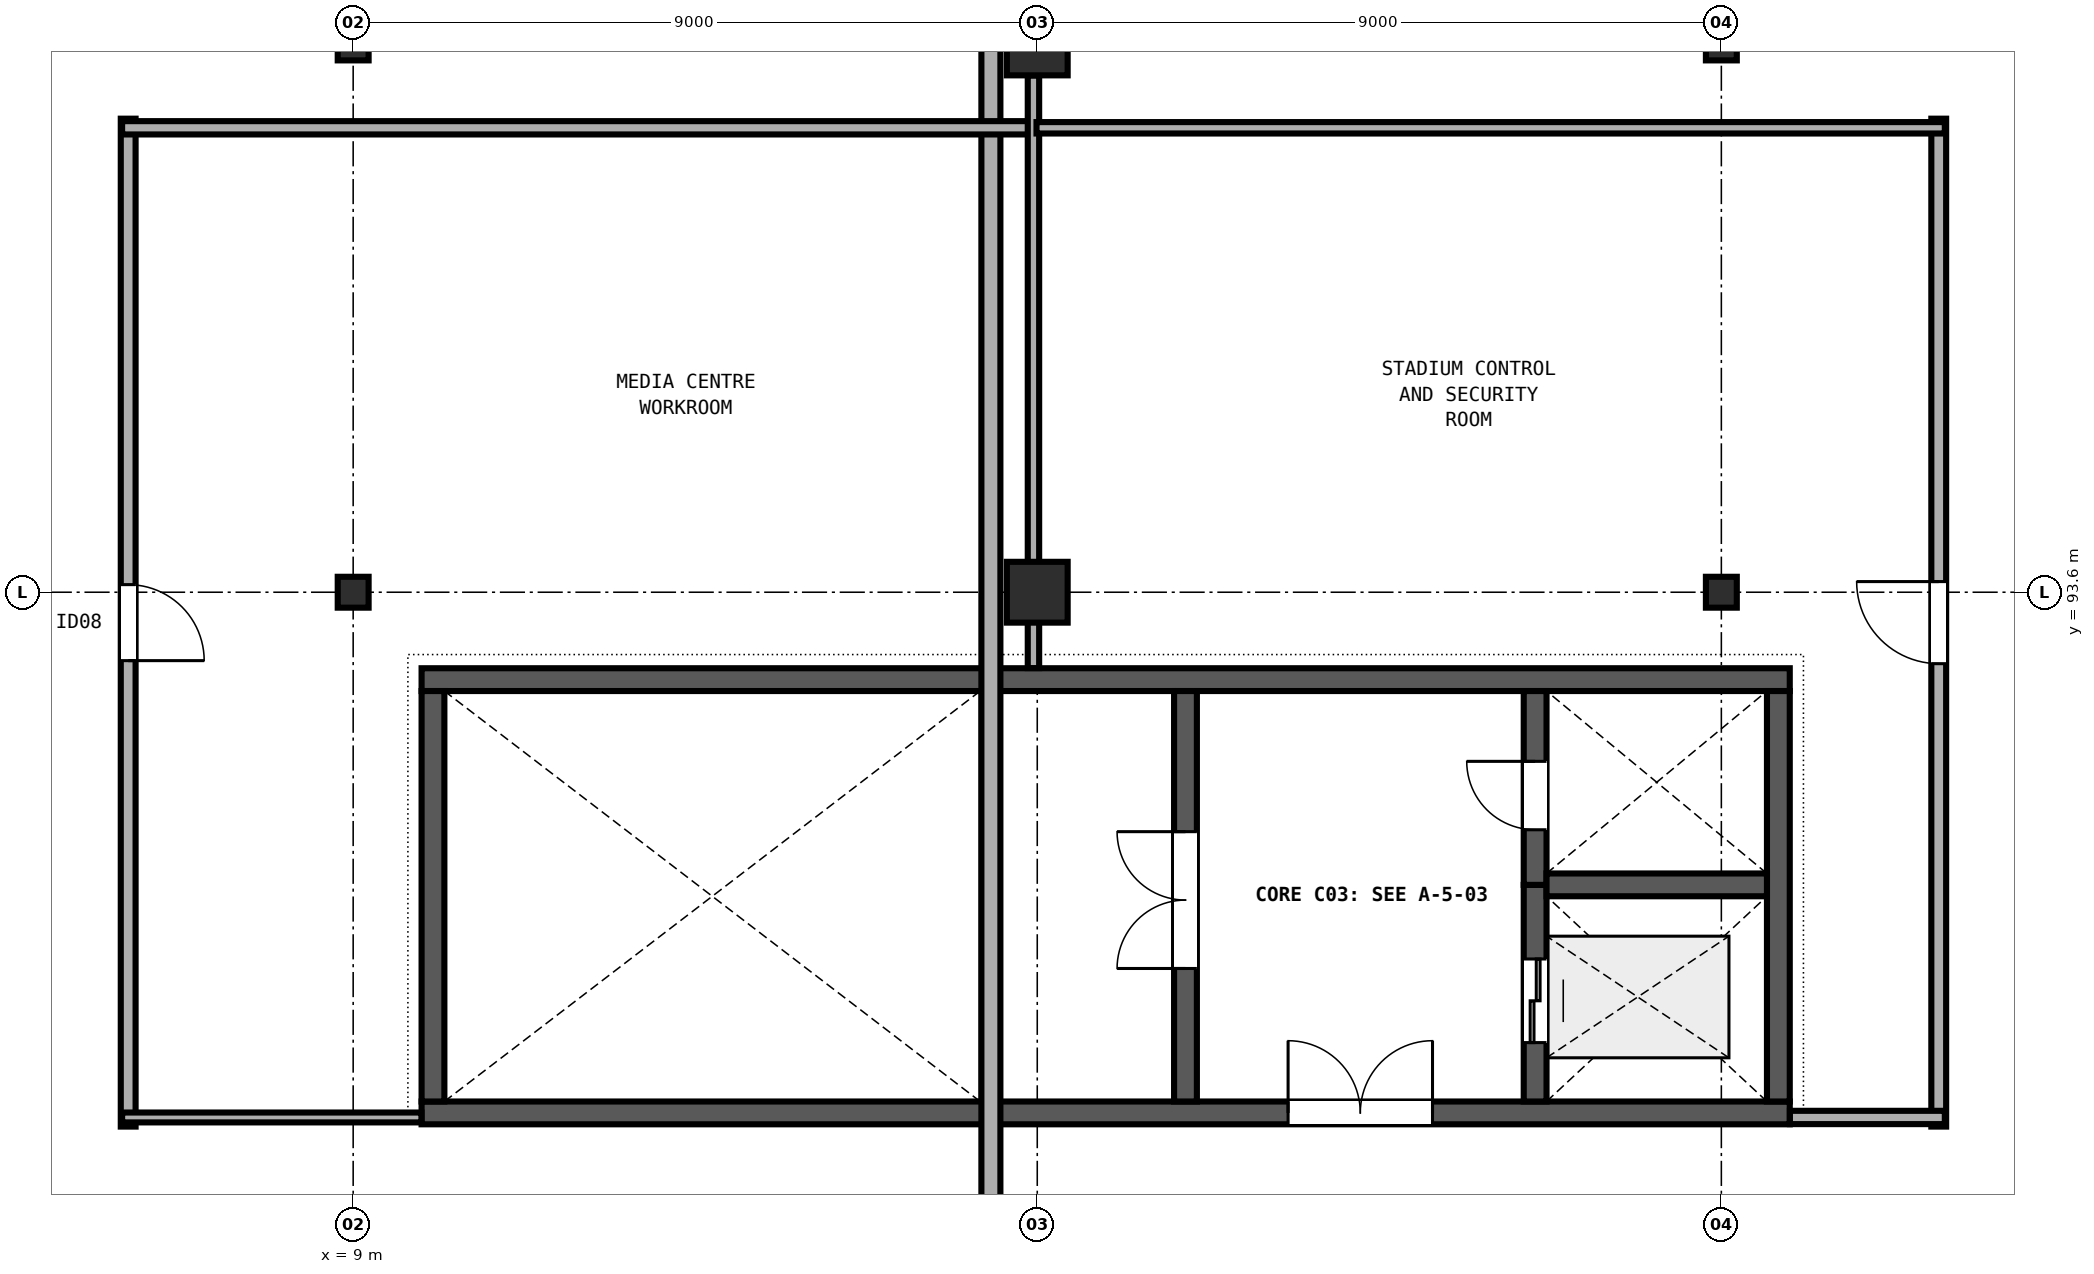
"""IFC4 building model, lengths in metres.
Left out: names, types, materials, properties, quantities, classifications, styles, units other than length and angle.
Written with IfcOpenShell. Run it as: python <this file> out.ifc"""

import sys

from ifc_helpers import new_model, si_unit, direction, frame, frame_2d, origin, origin_2d, place, context, subcontext, project, spatial, rectangle, hollow_circle, extrude, element, fill, save


model = new_model("IFC4")
c1 = context("Model", 3, precision=1e-05, world=origin(), true_north=direction((0.0, 1.0)))
c2 = subcontext(c1, "Body", "Model", "MODEL_VIEW")
j1 = project(units=[si_unit("LENGTHUNIT", "METRE"), si_unit("PLANEANGLEUNIT", "RADIAN")], contexts=[c1])
p1 = place(None, origin())
s1 = spatial("IfcSite", under=j1, at=p1, CompositionType="ELEMENT")
p2 = place(p1, origin())
s2 = spatial("IfcBuilding", under=s1, at=p2, CompositionType="ELEMENT")
p3 = place(p2, frame((0.0, 0.0, 24.0)))
s3 = spatial("IfcBuildingStorey", under=s2, at=p3, CompositionType="ELEMENT", Elevation=24.0)
for number, where, z_axis, x_axis in (
    (1, (9.0, 93.6, 0.0), (0.0, 0.0, 1.0), (1.0, 0.0, 0.0)),
    (2, (9.0, 100.8, 0.0), (0.0, 0.0, 1.0), (1.0, 0.0, 0.0)),
):
    element("IfcColumn", number, at=place(p3, frame(where, z_axis=z_axis, x_axis=x_axis)), inside=s3, PredefinedType="COLUMN", context=c2, shape_type="SweptSolid", body=[
        extrude(hollow_circle(Radius=0.203, WallThickness=0.014, at=origin_2d()), origin(), (0.0, 0.0, 1.0), 4.8),
    ])
for number, where, z_axis, x_axis in (
    (3, (18.0, 93.6, 0.0), (0.0, 0.0, 1.0), (1.0, 0.0, 0.0)),
    (4, (18.0, 100.8, 0.0), (0.0, 0.0, 1.0), (1.0, 0.0, 0.0)),
):
    element("IfcColumn", number, at=place(p3, frame(where, z_axis=z_axis, x_axis=x_axis)), inside=s3, PredefinedType="COLUMN", context=c2, shape_type="SweptSolid", body=[
        extrude(rectangle(XDim=0.8, YDim=0.8, at=origin_2d()), origin(), (0.0, 0.0, 1.0), 4.8),
    ])
for number, where, z_axis, x_axis in (
    (5, (27.0, 93.6, 0.0), (0.0, 0.0, 1.0), (1.0, 0.0, 0.0)),
    (6, (27.0, 100.8, 0.0), (0.0, 0.0, 1.0), (1.0, 0.0, 0.0)),
):
    element("IfcColumn", number, at=place(p3, frame(where, z_axis=z_axis, x_axis=x_axis)), inside=s3, PredefinedType="COLUMN", context=c2, shape_type="SweptSolid", body=[
        extrude(hollow_circle(Radius=0.203, WallThickness=0.014, at=origin_2d()), origin(), (0.0, 0.0, 1.0), 4.8),
    ])
p4 = place(p3, frame((9.9, 86.75, 0.0), z_axis=(0.0, 0.0, 1.0), x_axis=(1.0, 0.0, 0.0)))
e7 = element("IfcWall", 7, at=p4, inside=s3, PredefinedType="SHEAR", context=c2, shape_type="SweptSolid", body=[
    extrude(rectangle(XDim=18.0, YDim=0.3, at=frame_2d((9.0, 0.0))), origin(), (0.0, 0.0, 1.0), 4.56),
])
p5 = place(p4, frame((11.4, 0.0, 0.0)))
e8 = element("IfcOpeningElement", 8, at=p5, cuts=e7, PredefinedType="OPENING", context=c2, shape_type="SweptSolid", body=[
    extrude(rectangle(XDim=1.9, YDim=2.25, at=frame_2d((0.95, 1.125))), frame((0.0, 0.16, 0.0), z_axis=(0.0, -1.0, 0.0), x_axis=(1.0, 0.0, 0.0)), (0.0, 0.0, 1.0), 0.32),
])
p6 = place(p3, frame((27.9, 92.45, 0.0), z_axis=(0.0, 0.0, 1.0), x_axis=(-1.0, 0.0, 0.0)))
e9 = element("IfcWall", 9, at=p6, inside=s3, PredefinedType="SHEAR", context=c2, shape_type="SweptSolid", body=[
    extrude(rectangle(XDim=18.0, YDim=0.3, at=frame_2d((9.0, 0.0))), origin(), (0.0, 0.0, 1.0), 4.56),
])
for number, where, z_axis, x_axis in (
    (10, (10.05, 92.3, 0.0), (0.0, 0.0, 1.0), (0.0, -1.0, 0.0)),
    (11, (27.75, 86.9, 0.0), (0.0, 0.0, 1.0), (0.0, 1.0, 0.0)),
):
    element("IfcWall", number, at=place(p3, frame(where, z_axis=z_axis, x_axis=x_axis)), inside=s3, PredefinedType="SHEAR", context=c2, shape_type="SweptSolid", body=[
        extrude(rectangle(XDim=5.4, YDim=0.3, at=frame_2d((2.7, 0.0))), origin(), (0.0, 0.0, 1.0), 4.56),
    ])
p7 = place(p3, frame((19.95, 86.9, 0.0), z_axis=(0.0, 0.0, 1.0), x_axis=(0.0, 1.0, 0.0)))
e12 = element("IfcWall", 12, at=p7, inside=s3, PredefinedType="SHEAR", context=c2, shape_type="SweptSolid", body=[
    extrude(rectangle(XDim=5.4, YDim=0.3, at=frame_2d((2.7, 0.0))), origin(), (0.0, 0.0, 1.0), 4.56),
])
p8 = place(p7, frame((1.75, 0.0, 0.0)))
e13 = element("IfcOpeningElement", 13, at=p8, cuts=e12, PredefinedType="OPENING", context=c2, shape_type="SweptSolid", body=[
    extrude(rectangle(XDim=1.8, YDim=2.25, at=frame_2d((0.9, 1.125))), frame((0.0, 0.16, 0.0), z_axis=(0.0, -1.0, 0.0), x_axis=(1.0, 0.0, 0.0)), (0.0, 0.0, 1.0), 0.32),
])
p9 = place(p3, frame((24.55, 86.9, 0.0), z_axis=(0.0, 0.0, 1.0), x_axis=(0.0, 1.0, 0.0)))
e14 = element("IfcWall", 14, at=p9, inside=s3, PredefinedType="SHEAR", context=c2, shape_type="SweptSolid", body=[
    extrude(rectangle(XDim=2.85, YDim=0.3, at=frame_2d((1.425, 0.0))), origin(), (0.0, 0.0, 1.0), 4.56),
])
p10 = place(p9, frame((0.775, 0.0, 0.0)))
e15 = element("IfcOpeningElement", 15, at=p10, cuts=e14, PredefinedType="OPENING", context=c2, shape_type="SweptSolid", body=[
    extrude(rectangle(XDim=1.1, YDim=2.1, at=frame_2d((0.55, 1.05))), frame((0.0, 0.16, 0.0), z_axis=(0.0, -1.0, 0.0), x_axis=(1.0, 0.0, 0.0)), (0.0, 0.0, 1.0), 0.32),
])
p11 = place(p3, frame((24.55, 89.75, 0.0), z_axis=(0.0, 0.0, 1.0), x_axis=(0.0, 1.0, 0.0)))
e16 = element("IfcWall", 16, at=p11, inside=s3, PredefinedType="SHEAR", context=c2, shape_type="SweptSolid", body=[
    extrude(rectangle(XDim=2.55, YDim=0.3, at=frame_2d((1.275, 0.0))), origin(), (0.0, 0.0, 1.0), 4.56),
])
p12 = place(p11, frame((0.725, 0.0, 0.0)))
e17 = element("IfcOpeningElement", 17, at=p12, cuts=e16, PredefinedType="OPENING", context=c2, shape_type="SweptSolid", body=[
    extrude(rectangle(XDim=0.9, YDim=2.1, at=frame_2d((0.45, 1.05))), frame((0.0, 0.16, 0.0), z_axis=(0.0, -1.0, 0.0), x_axis=(1.0, 0.0, 0.0)), (0.0, 0.0, 1.0), 0.32),
])
p13 = place(p3, frame((24.7, 89.75, 0.0), z_axis=(0.0, 0.0, 1.0), x_axis=(1.0, 0.0, 0.0)))
e18 = element("IfcWall", 18, at=p13, inside=s3, PredefinedType="SHEAR", context=c2, shape_type="SweptSolid", body=[
    extrude(rectangle(XDim=2.9, YDim=0.3, at=frame_2d((1.45, 0.0))), origin(), (0.0, 0.0, 1.0), 4.56),
])
p14 = place(p3, frame((17.39, 116.84, 4.8), z_axis=(0.0, 0.0, 1.0), x_axis=(0.0, -1.0, 0.0)))
e19 = element("IfcWall", 19, at=p14, inside=s3, PredefinedType="PARAPET", context=c2, shape_type="SweptSolid", body=[
    extrude(rectangle(XDim=71.68, YDim=0.25, at=frame_2d((35.84, 0.0))), origin(), (0.0, 0.0, 1.0), 0.65),
])
p15 = place(p3, frame((6.04, 99.83, 0.0), z_axis=(0.0, 0.0, 1.0), x_axis=(0.0, -1.0, 0.0)))
e20 = element("IfcWall", 20, at=p15, inside=s3, PredefinedType="PARTITIONING", context=c2, shape_type="SweptSolid", body=[
    extrude(rectangle(XDim=13.26, YDim=0.195, at=frame_2d((6.63, 0.0))), origin(), (0.0, 0.0, 1.0), 3.56),
])
p16 = place(p15, frame((6.13, 0.0, 0.0)))
e21 = element("IfcOpeningElement", 21, at=p16, cuts=e20, PredefinedType="OPENING", context=c2, shape_type="SweptSolid", body=[
    extrude(rectangle(XDim=1.0, YDim=2.1, at=frame_2d((0.5, 1.05))), frame((0.0, 0.107, 0.0), z_axis=(0.0, -1.0, 0.0), x_axis=(1.0, 0.0, 0.0)), (0.0, 0.0, 1.0), 0.215),
])
p17 = place(p3, frame((5.96, 99.71, 0.0), z_axis=(0.0, 0.0, 1.0), x_axis=(1.0, 0.0, 0.0)))
e22 = element("IfcWall", 22, at=p17, inside=s3, PredefinedType="PARTITIONING", context=c2, shape_type="SweptSolid", body=[
    extrude(rectangle(XDim=11.95, YDim=0.175, at=frame_2d((5.975, 0.0))), origin(), (0.0, 0.0, 1.0), 3.56),
])
p18 = place(p3, frame((17.95, 100.398, 0.0), z_axis=(0.0, 0.0, 1.0), x_axis=(0.0, -1.0, 0.0)))
e23 = element("IfcWall", 23, at=p18, inside=s3, PredefinedType="PARTITIONING", context=c2, shape_type="SweptSolid", body=[
    extrude(rectangle(XDim=7.796, YDim=0.15, at=frame_2d((3.898, 0.0))), origin(), (0.0, 0.0, 1.0), 3.56),
])
p19 = place(p3, frame((9.898, 86.69, 0.0), z_axis=(0.0, 0.0, 1.0), x_axis=(-1.0, 0.0, 0.0)))
e24 = element("IfcWall", 24, at=p19, inside=s3, PredefinedType="PARTITIONING", context=c2, shape_type="SweptSolid", body=[
    extrude(rectangle(XDim=3.938, YDim=0.13, at=frame_2d((1.969, 0.0))), origin(), (0.0, 0.0, 1.0), 3.56),
])
p20 = place(p3, frame((29.86, 86.57, 0.0), z_axis=(0.0, 0.0, 1.0), x_axis=(0.0, 1.0, 0.0)))
e25 = element("IfcWall", 25, at=p20, inside=s3, PredefinedType="PARTITIONING", context=c2, shape_type="SweptSolid", body=[
    extrude(rectangle(XDim=13.26, YDim=0.195, at=frame_2d((6.63, 0.0))), origin(), (0.0, 0.0, 1.0), 3.56),
])
p21 = place(p20, frame((6.09, 0.0, 0.0)))
e26 = element("IfcOpeningElement", 26, at=p21, cuts=e25, PredefinedType="OPENING", context=c2, shape_type="SweptSolid", body=[
    extrude(rectangle(XDim=1.08, YDim=2.18, at=frame_2d((0.54, 1.09))), frame((0.0, 0.107, 0.0), z_axis=(0.0, -1.0, 0.0), x_axis=(1.0, 0.0, 0.0)), (0.0, 0.0, 1.0), 0.215),
])
p22 = place(p3, frame((29.94, 86.69, 0.0), z_axis=(0.0, 0.0, 1.0), x_axis=(-1.0, 0.0, 0.0)))
e27 = element("IfcWall", 27, at=p22, inside=s3, PredefinedType="PARTITIONING", context=c2, shape_type="SweptSolid", body=[
    extrude(rectangle(XDim=2.038, YDim=0.175, at=frame_2d((1.019, 0.0))), origin(), (0.0, 0.0, 1.0), 3.56),
])
p23 = place(p3, frame((17.99, 99.71, 0.0), z_axis=(0.0, 0.0, 1.0), x_axis=(1.0, 0.0, 0.0)))
e28 = element("IfcWall", 28, at=p23, inside=s3, PredefinedType="PARTITIONING", context=c2, shape_type="SweptSolid", body=[
    extrude(rectangle(XDim=11.95, YDim=0.15, at=frame_2d((5.975, 0.0))), origin(), (0.0, 0.0, 1.0), 3.56),
])
p24 = place(p8, origin())
e29 = element("IfcDoor", 29, at=p24, inside=s3, OperationType="DOUBLE_DOOR_SINGLE_SWING", PredefinedType="DOOR", context=c2, shape_type="SweptSolid", body=[
    extrude(rectangle(XDim=1.8, YDim=2.25, at=frame_2d((0.9, 1.125))), frame((0.0, 0.025, 0.0), z_axis=(0.0, -1.0, 0.0), x_axis=(1.0, 0.0, 0.0)), (0.0, 0.0, 1.0), 0.05),
])
fill(e13, e29)
p25 = place(p12, origin())
e30 = element("IfcDoor", 30, at=p25, inside=s3, OperationType="SINGLE_SWING_RIGHT", PredefinedType="DOOR", context=c2, shape_type="SweptSolid", body=[
    extrude(rectangle(XDim=0.9, YDim=2.1, at=frame_2d((0.45, 1.05))), frame((0.0, 0.025, 0.0), z_axis=(0.0, -1.0, 0.0), x_axis=(1.0, 0.0, 0.0)), (0.0, 0.0, 1.0), 0.05),
])
fill(e17, e30)
p26 = place(p10, origin())
e31 = element("IfcDoor", 31, at=p26, inside=s3, OperationType="DOUBLE_DOOR_SLIDING", PredefinedType="DOOR", context=c2, shape_type="SweptSolid", body=[
    extrude(rectangle(XDim=1.1, YDim=2.1, at=frame_2d((0.55, 1.05))), frame((0.0, 0.025, 0.0), z_axis=(0.0, -1.0, 0.0), x_axis=(1.0, 0.0, 0.0)), (0.0, 0.0, 1.0), 0.05),
])
fill(e15, e31)
p27 = place(p5, origin())
e32 = element("IfcDoor", 32, at=p27, inside=s3, OperationType="DOUBLE_DOOR_SINGLE_SWING", PredefinedType="DOOR", context=c2, shape_type="SweptSolid", body=[
    extrude(rectangle(XDim=1.9, YDim=2.25, at=frame_2d((0.95, 1.125))), frame((0.0, 0.025, 0.0), z_axis=(0.0, -1.0, 0.0), x_axis=(1.0, 0.0, 0.0)), (0.0, 0.0, 1.0), 0.05),
])
fill(e8, e32)
p28 = place(p16, origin())
e33 = element("IfcDoor", 33, at=p28, inside=s3, OperationType="SINGLE_SWING_RIGHT", PredefinedType="DOOR", context=c2, shape_type="SweptSolid", body=[
    extrude(rectangle(XDim=1.0, YDim=2.1, at=frame_2d((0.5, 1.05))), frame((0.0, 0.025, 0.0), z_axis=(0.0, -1.0, 0.0), x_axis=(1.0, 0.0, 0.0)), (0.0, 0.0, 1.0), 0.05),
])
fill(e21, e33)
p29 = place(p21, origin())
e34 = element("IfcDoor", 34, at=p29, inside=s3, OperationType="SINGLE_SWING_RIGHT", PredefinedType="DOOR", context=c2, shape_type="SweptSolid", body=[
    extrude(rectangle(XDim=1.08, YDim=2.18, at=frame_2d((0.54, 1.09))), frame((0.0, 0.025, 0.0), z_axis=(0.0, -1.0, 0.0), x_axis=(1.0, 0.0, 0.0)), (0.0, 0.0, 1.0), 0.05),
])
fill(e26, e34)
save(model, sys.argv[1])
